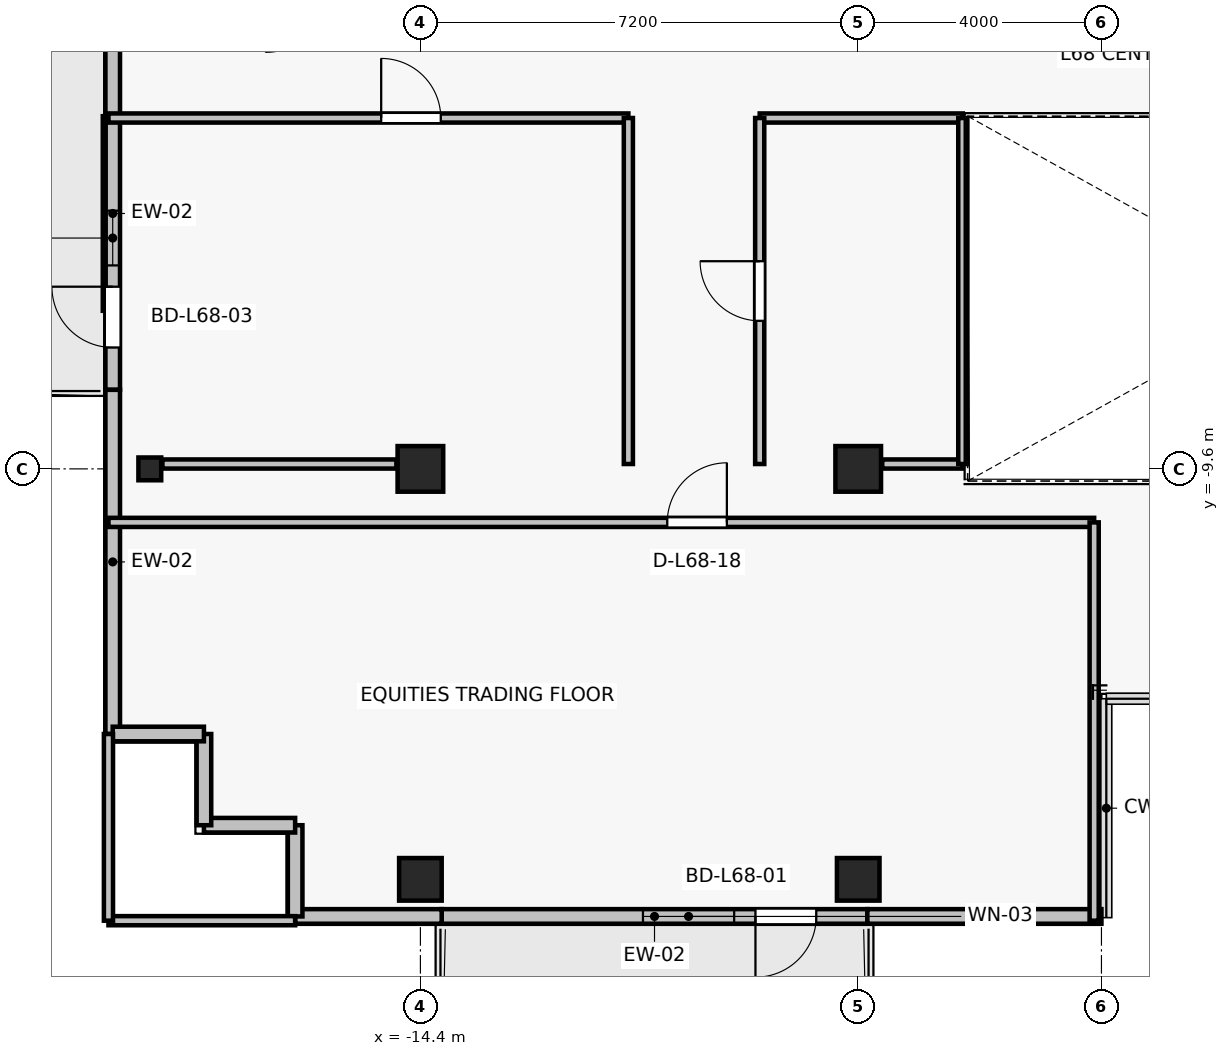
"""IFC4 building model, lengths in metres.
Left out: names, types, materials, properties, quantities, classifications, styles, units other than length and angle.
Written with IfcOpenShell. Run it as: python <this file> out.ifc"""

import sys

from ifc_helpers import new_model, si_unit, direction, frame, frame_2d, origin, origin_2d, place, context, subcontext, project, spatial, rectangle, i_section, extrude, source, transform, mapped, element, fill, save


model = new_model("IFC4")
c1 = context("Model", 3, precision=1e-05, world=origin(), true_north=direction((0.0, 1.0)))
c2 = subcontext(c1, "Body", "Model", "MODEL_VIEW")
j1 = project(units=[si_unit("LENGTHUNIT", "METRE"), si_unit("PLANEANGLEUNIT", "RADIAN")], contexts=[c1])
p1 = place(None, origin())
s1 = spatial("IfcSite", under=j1, at=p1, CompositionType="ELEMENT")
p2 = place(p1, origin())
s2 = spatial("IfcBuilding", under=s1, at=p2, CompositionType="ELEMENT")
p3 = place(p2, frame((0.0, 0.0, 241.9)))
s3 = spatial("IfcBuildingStorey", under=s2, at=p3, CompositionType="ELEMENT", Elevation=241.9)
for number, where, z_axis, x_axis in (
    (1, (-14.4, -9.6, 0.0), (0.0, 0.0, 1.0), (1.0, 0.0, 0.0)),
    (2, (-7.2, -9.6, 0.0), (0.0, 0.0, 1.0), (1.0, 0.0, 0.0)),
):
    element("IfcColumn", number, at=place(p3, frame(where, z_axis=z_axis, x_axis=x_axis)), inside=s3, PredefinedType="COLUMN", context=c2, shape_type="SweptSolid", body=[
        extrude(rectangle(XDim=0.75, YDim=0.75, at=origin_2d()), origin(), (0.0, 0.0, 1.0), 3.3),
    ])
for number, where, z_axis, x_axis in (
    (3, (-14.4, -16.35, 0.0), (0.0, 0.0, 1.0), (1.0, 0.0, 0.0)),
    (4, (-7.2, -16.35, 0.0), (0.0, 0.0, 1.0), (1.0, 0.0, 0.0)),
):
    element("IfcColumn", number, at=place(p3, frame(where, z_axis=z_axis, x_axis=x_axis)), inside=s3, PredefinedType="COLUMN", context=c2, shape_type="SweptSolid", body=[
        extrude(rectangle(XDim=0.7, YDim=0.7, at=origin_2d()), origin(), (0.0, 0.0, 1.0), 3.3),
    ])
p4 = place(p3, frame((-18.85, -9.6, 0.0), z_axis=(0.0, 0.0, 1.0), x_axis=(1.0, 0.0, 0.0)))
e5 = element("IfcColumn", 5, at=p4, inside=s3, PredefinedType="COLUMN", context=c2, shape_type="SweptSolid", body=[
    extrude(i_section(OverallWidth=0.375, OverallDepth=0.375, WebThickness=0.017, FlangeThickness=0.027, FilletRadius=0.015, at=origin_2d()), origin(), (0.0, 0.0, 1.0), 3.3),
])
p5 = place(p3, frame((-7.05, -16.96, 0.0), z_axis=(0.0, 0.0, 1.0), x_axis=(-1.0, 0.0, 0.0)))
e6 = element("IfcWall", 6, at=p5, inside=s3, PredefinedType="SOLIDWALL", context=c2, shape_type="SweptSolid", body=[
    extrude(rectangle(XDim=7.0, YDim=0.24, at=frame_2d((3.5, 0.0))), origin(), (0.0, 0.0, 1.0), 2.665),
])
p6 = place(p5, frame((0.84, 0.0, 0.0)))
e7 = element("IfcOpeningElement", 7, at=p6, cuts=e6, PredefinedType="OPENING", context=c2, shape_type="SweptSolid", body=[
    extrude(rectangle(XDim=1.0, YDim=2.2, at=frame_2d((0.5, 1.1))), frame((0.0, 0.13, 0.0), z_axis=(0.0, -1.0, 0.0), x_axis=(1.0, 0.0, 0.0)), (0.0, 0.0, 1.0), 0.26),
])
p7 = place(p5, frame((2.19, 0.0, 0.85)))
e8 = element("IfcOpeningElement", 8, at=p7, cuts=e6, PredefinedType="OPENING", context=c2, shape_type="SweptSolid", body=[
    extrude(rectangle(XDim=1.5, YDim=1.6, at=frame_2d((0.75, 0.8))), frame((0.0, 0.13, 0.0), z_axis=(0.0, -1.0, 0.0), x_axis=(1.0, 0.0, 0.0)), (0.0, 0.0, 1.0), 0.26),
])
p8 = place(p3, frame((-19.46, -8.3, 0.0), z_axis=(0.0, 0.0, 1.0), x_axis=(0.0, 1.0, 0.0)))
e9 = element("IfcWall", 9, at=p8, inside=s3, PredefinedType="SOLIDWALL", context=c2, shape_type="SweptSolid", body=[
    extrude(rectangle(XDim=5.8, YDim=0.24, at=frame_2d((2.9, 0.0))), origin(), (0.0, 0.0, 1.0), 3.075),
])
p9 = place(p8, frame((0.696, 0.0, 0.0)))
e10 = element("IfcOpeningElement", 10, at=p9, cuts=e9, PredefinedType="OPENING", context=c2, shape_type="SweptSolid", body=[
    extrude(rectangle(XDim=1.0, YDim=2.2, at=frame_2d((0.5, 1.1))), frame((0.0, 0.13, 0.0), z_axis=(0.0, -1.0, 0.0), x_axis=(1.0, 0.0, 0.0)), (0.0, 0.0, 1.0), 0.26),
])
p10 = place(p8, frame((2.046, 0.0, 0.85)))
e11 = element("IfcOpeningElement", 11, at=p10, cuts=e9, PredefinedType="OPENING", context=c2, shape_type="SweptSolid", body=[
    extrude(rectangle(XDim=0.9, YDim=1.35, at=frame_2d((0.45, 0.675))), frame((0.0, 0.13, 0.0), z_axis=(0.0, -1.0, 0.0), x_axis=(1.0, 0.0, 0.0)), (0.0, 0.0, 1.0), 0.26),
])
p11 = place(p3, frame((-19.46, -8.3, 0.0), z_axis=(0.0, 0.0, 1.0), x_axis=(0.0, -1.0, 0.0)))
e12 = element("IfcWall", 12, at=p11, inside=s3, PredefinedType="SOLIDWALL", context=c2, shape_type="SweptSolid", body=[
    extrude(rectangle(XDim=5.66, YDim=0.24, at=frame_2d((2.83, 0.0))), origin(), (0.0, 0.0, 1.0), 3.075),
])
p12 = place(p3, frame((-7.05, -16.96, 0.0), z_axis=(0.0, 0.0, 1.0), x_axis=(1.0, 0.0, 0.0)))
e13 = element("IfcWall", 13, at=p12, inside=s3, PredefinedType="SOLIDWALL", context=c2, shape_type="SweptSolid", body=[
    extrude(rectangle(XDim=3.85, YDim=0.24, at=frame_2d((1.925, 0.0))), origin(), (0.0, 0.0, 1.0), 3.075),
])
p13 = place(p3, frame((-16.46, -16.96, 0.0), z_axis=(0.0, 0.0, 1.0), x_axis=(1.0, 0.0, 0.0)))
e14 = element("IfcWall", 14, at=p13, inside=s3, PredefinedType="SOLIDWALL", context=c2, shape_type="SweptSolid", body=[
    extrude(rectangle(XDim=2.41, YDim=0.24, at=frame_2d((1.205, 0.0))), origin(), (0.0, 0.0, 1.0), 3.075),
])
for number, where, z_axis, x_axis in (
    (15, (-16.46, -15.46, 0.0), (0.0, 0.0, 1.0), (0.0, -1.0, 0.0)),
    (16, (-17.96, -15.46, 0.0), (0.0, 0.0, 1.0), (1.0, 0.0, 0.0)),
    (17, (-17.96, -13.96, 0.0), (0.0, 0.0, 1.0), (0.0, -1.0, 0.0)),
    (18, (-19.46, -13.96, 0.0), (0.0, 0.0, 1.0), (1.0, 0.0, 0.0)),
):
    element("IfcWall", number, at=place(p3, frame(where, z_axis=z_axis, x_axis=x_axis)), inside=s3, PredefinedType="SOLIDWALL", context=c2, shape_type="SweptSolid", body=[
        extrude(rectangle(XDim=1.5, YDim=0.24, at=frame_2d((0.75, 0.0))), origin(), (0.0, 0.0, 1.0), 3.075),
    ])
p14 = place(p3, frame((-14.795, -9.52, 0.0), z_axis=(0.0, 0.0, 1.0), x_axis=(-1.0, 0.0, 0.0)))
e19 = element("IfcWall", 19, at=p14, inside=s3, PredefinedType="PARTITIONING", context=c2, shape_type="SweptSolid", body=[
    extrude(rectangle(XDim=3.848, YDim=0.15, at=frame_2d((1.924, 0.0))), origin(), (0.0, 0.0, 1.0), 2.615),
])
p15 = place(p3, frame((-19.53, -3.83, 0.0), z_axis=(0.0, 0.0, 1.0), x_axis=(1.0, 0.0, 0.0)))
e20 = element("IfcWall", 20, at=p15, inside=s3, PredefinedType="PARTITIONING", context=c2, shape_type="SweptSolid", body=[
    extrude(rectangle(XDim=8.55, YDim=0.15, at=frame_2d((4.275, 0.0))), origin(), (0.0, 0.0, 1.0), 2.615),
])
p16 = place(p15, frame((4.485, 0.0, 0.0)))
e21 = element("IfcOpeningElement", 21, at=p16, cuts=e20, PredefinedType="OPENING", context=c2, shape_type="SweptSolid", body=[
    extrude(rectangle(XDim=0.98, YDim=2.15, at=frame_2d((0.49, 1.075))), frame((0.0, 0.085, 0.0), z_axis=(0.0, -1.0, 0.0), x_axis=(1.0, 0.0, 0.0)), (0.0, 0.0, 1.0), 0.17),
])
p17 = place(p3, frame((-10.98, -3.83, 0.0), z_axis=(0.0, 0.0, 1.0), x_axis=(0.0, -1.0, 0.0)))
e22 = element("IfcWall", 22, at=p17, inside=s3, PredefinedType="PARTITIONING", context=c2, shape_type="SweptSolid", body=[
    extrude(rectangle(XDim=5.69, YDim=0.15, at=frame_2d((2.845, 0.0))), origin(), (0.0, 0.0, 1.0), 2.615),
])
p18 = place(p3, frame((-16.46, -17.03, 0.0), z_axis=(0.0, 0.0, 1.0), x_axis=(-1.0, 0.0, 0.0)))
e23 = element("IfcWall", 23, at=p18, inside=s3, PredefinedType="PARTITIONING", context=c2, shape_type="SweptSolid", body=[
    extrude(rectangle(XDim=3.07, YDim=0.15, at=frame_2d((1.535, 0.0))), origin(), (0.0, 0.0, 1.0), 2.665),
])
p19 = place(p3, frame((-19.53, -10.48, 0.0), z_axis=(0.0, 0.0, 1.0), x_axis=(1.0, 0.0, 0.0)))
e24 = element("IfcWall", 24, at=p19, inside=s3, PredefinedType="PARTITIONING", context=c2, shape_type="SweptSolid", body=[
    extrude(rectangle(XDim=16.21, YDim=0.15, at=frame_2d((8.105, 0.0))), origin(), (0.0, 0.0, 1.0), 2.615),
])
p20 = place(p19, frame((9.19, 0.0, 0.0)))
e25 = element("IfcOpeningElement", 25, at=p20, cuts=e24, PredefinedType="OPENING", context=c2, shape_type="SweptSolid", body=[
    extrude(rectangle(XDim=0.98, YDim=2.15, at=frame_2d((0.49, 1.075))), frame((0.0, 0.085, 0.0), z_axis=(0.0, -1.0, 0.0), x_axis=(1.0, 0.0, 0.0)), (0.0, 0.0, 1.0), 0.17),
])
p21 = place(p3, frame((-19.53, -17.03, 0.0), z_axis=(0.0, 0.0, 1.0), x_axis=(0.0, 1.0, 0.0)))
e26 = element("IfcWall", 26, at=p21, inside=s3, PredefinedType="PARTITIONING", context=c2, shape_type="SweptSolid", body=[
    extrude(rectangle(XDim=3.07, YDim=0.15, at=frame_2d((1.535, 0.0))), origin(), (0.0, 0.0, 1.0), 3.075),
])
p22 = place(p3, frame((-3.32, -10.48, 0.0), z_axis=(0.0, 0.0, 1.0), x_axis=(0.0, -1.0, 0.0)))
e27 = element("IfcWall", 27, at=p22, inside=s3, PredefinedType="PARTITIONING", context=c2, shape_type="SweptSolid", body=[
    extrude(rectangle(XDim=6.55, YDim=0.15, at=frame_2d((3.275, 0.0))), origin(), (0.0, 0.0, 1.0), 2.615),
])
p23 = place(p3, frame((-5.48, -9.52, 0.0), z_axis=(0.0, 0.0, 1.0), x_axis=(-1.0, 0.0, 0.0)))
e28 = element("IfcWall", 28, at=p23, inside=s3, PredefinedType="PARTITIONING", context=c2, shape_type="SweptSolid", body=[
    extrude(rectangle(XDim=1.325, YDim=0.15, at=frame_2d((0.663, 0.0))), origin(), (0.0, 0.0, 1.0), 2.615),
])
p24 = place(p3, frame((-8.82, -3.83, 0.0), z_axis=(0.0, 0.0, 1.0), x_axis=(1.0, 0.0, 0.0)))
e29 = element("IfcWall", 29, at=p24, inside=s3, PredefinedType="PARTITIONING", context=c2, shape_type="SweptSolid", body=[
    extrude(rectangle(XDim=3.34, YDim=0.15, at=frame_2d((1.67, 0.0))), origin(), (0.0, 0.0, 1.0), 2.615),
])
p25 = place(p3, frame((-8.82, -9.52, 0.0), z_axis=(0.0, 0.0, 1.0), x_axis=(0.0, 1.0, 0.0)))
e30 = element("IfcWall", 30, at=p25, inside=s3, PredefinedType="PARTITIONING", context=c2, shape_type="SweptSolid", body=[
    extrude(rectangle(XDim=5.69, YDim=0.15, at=frame_2d((2.845, 0.0))), origin(), (0.0, 0.0, 1.0), 2.615),
])
p26 = place(p25, frame((2.355, 0.0, 0.0)))
e31 = element("IfcOpeningElement", 31, at=p26, cuts=e30, PredefinedType="OPENING", context=c2, shape_type="SweptSolid", body=[
    extrude(rectangle(XDim=0.98, YDim=2.15, at=frame_2d((0.49, 1.075))), frame((0.0, 0.085, 0.0), z_axis=(0.0, -1.0, 0.0), x_axis=(1.0, 0.0, 0.0)), (0.0, 0.0, 1.0), 0.17),
])
p27 = place(p3, frame((-5.48, -3.83, 0.0), z_axis=(0.0, 0.0, 1.0), x_axis=(0.0, -1.0, 0.0)))
e32 = element("IfcWall", 32, at=p27, inside=s3, PredefinedType="PARTITIONING", context=c2, shape_type="SweptSolid", body=[
    extrude(rectangle(XDim=5.69, YDim=0.15, at=frame_2d((2.845, 0.0))), origin(), (0.0, 0.0, 1.0), 2.615),
])
m1 = source(origin(), c2, "Body", "SweptSolid", [
    extrude(rectangle(XDim=1.0, YDim=2.2, at=frame_2d((0.5, 1.1))), frame((0.0, 0.025, 0.0), z_axis=(0.0, -1.0, 0.0), x_axis=(1.0, 0.0, 0.0)), (0.0, 0.0, 1.0), 0.05),
])
p28 = place(p6, origin())
e33 = element("IfcDoor", 33, at=p28, inside=s3, OperationType="SINGLE_SWING_RIGHT", PredefinedType="DOOR", context=c2, shape_type="MappedRepresentation", body=[
    mapped(m1, transform((0.0, 0.0, 0.0), x_axis=(1.0, 0.0, 0.0), y_axis=(0.0, 1.0, 0.0), z_axis=(0.0, 0.0, 1.0), scale=1.0)),
])
fill(e7, e33)
m2 = source(origin(), c2, "Body", "SweptSolid", [
    extrude(rectangle(XDim=1.5, YDim=1.6, at=frame_2d((0.75, 0.8))), frame((0.0, 0.03, 0.0), z_axis=(0.0, -1.0, 0.0), x_axis=(1.0, 0.0, 0.0)), (0.0, 0.0, 1.0), 0.06),
])
p29 = place(p7, origin())
e34 = element("IfcWindow", 34, at=p29, inside=s3, PartitioningType="SINGLE_PANEL", PredefinedType="WINDOW", context=c2, shape_type="MappedRepresentation", body=[
    mapped(m2, transform((0.0, 0.0, 0.0), x_axis=(1.0, 0.0, 0.0), y_axis=(0.0, 1.0, 0.0), z_axis=(0.0, 0.0, 1.0), scale=1.0)),
])
fill(e8, e34)
p30 = place(p9, origin())
e35 = element("IfcDoor", 35, at=p30, inside=s3, OperationType="SINGLE_SWING_RIGHT", PredefinedType="DOOR", context=c2, shape_type="MappedRepresentation", body=[
    mapped(m1, transform((0.0, 0.0, 0.0), x_axis=(1.0, 0.0, 0.0), y_axis=(0.0, 1.0, 0.0), z_axis=(0.0, 0.0, 1.0), scale=1.0)),
])
fill(e10, e35)
m3 = source(origin(), c2, "Body", "SweptSolid", [
    extrude(rectangle(XDim=0.9, YDim=1.35, at=frame_2d((0.45, 0.675))), frame((0.0, 0.03, 0.0), z_axis=(0.0, -1.0, 0.0), x_axis=(1.0, 0.0, 0.0)), (0.0, 0.0, 1.0), 0.06),
])
p31 = place(p10, origin())
e36 = element("IfcWindow", 36, at=p31, inside=s3, PartitioningType="SINGLE_PANEL", PredefinedType="WINDOW", context=c2, shape_type="MappedRepresentation", body=[
    mapped(m3, transform((0.0, 0.0, 0.0), x_axis=(1.0, 0.0, 0.0), y_axis=(0.0, 1.0, 0.0), z_axis=(0.0, 0.0, 1.0), scale=1.0)),
])
fill(e11, e36)
m4 = source(origin(), c2, "Body", "SweptSolid", [
    extrude(rectangle(XDim=0.98, YDim=2.15, at=frame_2d((0.49, 1.075))), frame((0.0, 0.025, 0.0), z_axis=(0.0, -1.0, 0.0), x_axis=(1.0, 0.0, 0.0)), (0.0, 0.0, 1.0), 0.05),
])
p32 = place(p16, origin())
e37 = element("IfcDoor", 37, at=p32, inside=s3, OperationType="SINGLE_SWING_LEFT", PredefinedType="DOOR", context=c2, shape_type="MappedRepresentation", body=[
    mapped(m4, transform((0.0, 0.0, 0.0), x_axis=(1.0, 0.0, 0.0), y_axis=(0.0, 1.0, 0.0), z_axis=(0.0, 0.0, 1.0), scale=1.0)),
])
fill(e21, e37)
p33 = place(p20, origin())
e38 = element("IfcDoor", 38, at=p33, inside=s3, OperationType="SINGLE_SWING_RIGHT", PredefinedType="DOOR", context=c2, shape_type="MappedRepresentation", body=[
    mapped(m4, transform((0.0, 0.0, 0.0), x_axis=(1.0, 0.0, 0.0), y_axis=(0.0, 1.0, 0.0), z_axis=(0.0, 0.0, 1.0), scale=1.0)),
])
fill(e25, e38)
p34 = place(p26, origin())
e39 = element("IfcDoor", 39, at=p34, inside=s3, OperationType="SINGLE_SWING_RIGHT", PredefinedType="DOOR", context=c2, shape_type="MappedRepresentation", body=[
    mapped(m4, transform((0.0, 0.0, 0.0), x_axis=(1.0, 0.0, 0.0), y_axis=(0.0, 1.0, 0.0), z_axis=(0.0, 0.0, 1.0), scale=1.0)),
])
fill(e31, e39)
save(model, sys.argv[1])
